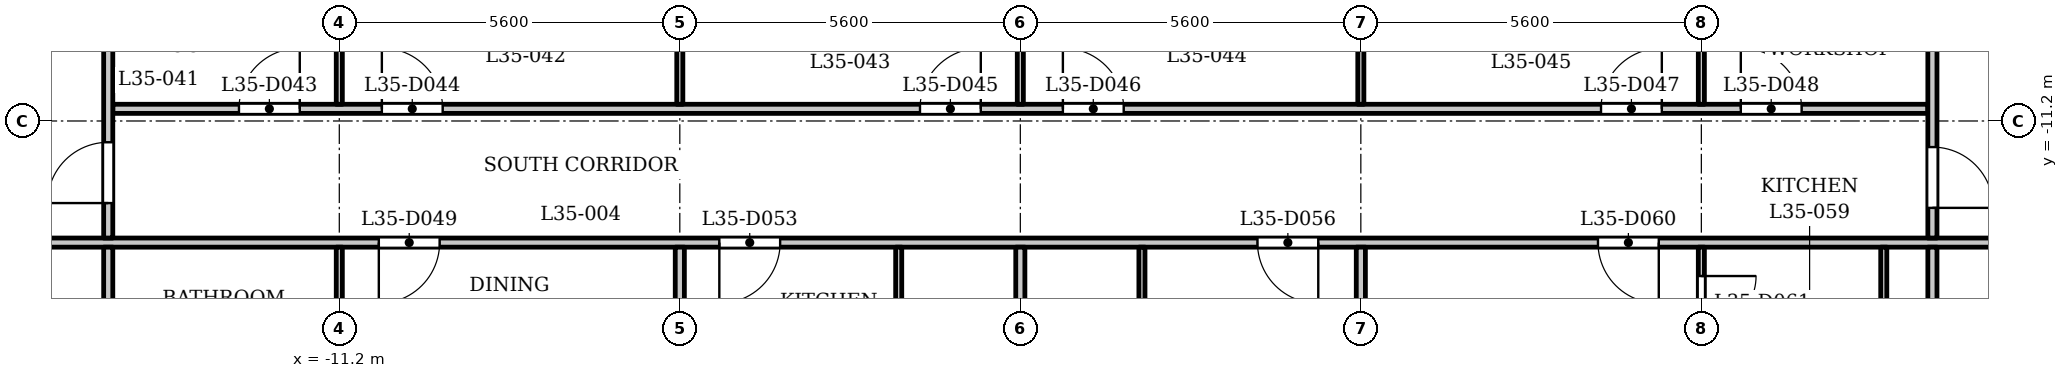
"""IFC4 building model, lengths in metres.
Left out: names, types, materials, properties, quantities, classifications, styles, units other than length and angle.
Written with IfcOpenShell. Run it as: python <this file> out.ifc"""

import sys

from ifc_helpers import new_model, si_unit, direction, frame, frame_2d, origin, place, context, subcontext, project, spatial, rectangle, extrude, element, fill, save


model = new_model("IFC4")
c1 = context("Model", 3, precision=1e-05, world=origin(), true_north=direction((0.0, 1.0)))
c2 = subcontext(c1, "Body", "Model", "MODEL_VIEW")
j1 = project(units=[si_unit("LENGTHUNIT", "METRE"), si_unit("PLANEANGLEUNIT", "RADIAN")], contexts=[c1])
p1 = place(None, origin())
s1 = spatial("IfcSite", under=j1, at=p1, CompositionType="ELEMENT")
p2 = place(p1, origin())
s2 = spatial("IfcBuilding", under=s1, at=p2, CompositionType="ELEMENT")
p3 = place(p2, frame((0.0, 0.0, 139.6)))
s3 = spatial("IfcBuildingStorey", under=s2, at=p3, CompositionType="ELEMENT", Elevation=139.6)
p4 = place(p3, frame((-17.4, -13.2, 0.0), z_axis=(0.0, 0.0, 1.0), x_axis=(1.0, 0.0, 0.0)))
e1 = element("IfcWall", 1, at=p4, inside=s3, PredefinedType="PARTITIONING", context=c2, shape_type="SweptSolid", body=[
    extrude(rectangle(XDim=34.8, YDim=0.15, at=frame_2d((17.4, 0.0))), origin(), (0.0, 0.0, 1.0), 3.2),
])
p5 = place(p4, frame((0.15, 0.0, 0.0)))
e2 = element("IfcOpeningElement", 2, at=p5, cuts=e1, PredefinedType="OPENING", context=c2, shape_type="SweptSolid", body=[
    extrude(rectangle(XDim=1.0, YDim=2.1, at=frame_2d((0.5, 1.05))), frame((0.0, 0.085, 0.0), z_axis=(0.0, -1.0, 0.0), x_axis=(1.0, 0.0, 0.0)), (0.0, 0.0, 1.0), 0.17),
])
p6 = place(p4, frame((33.55, 0.0, 0.0)))
e3 = element("IfcOpeningElement", 3, at=p6, cuts=e1, PredefinedType="OPENING", context=c2, shape_type="SweptSolid", body=[
    extrude(rectangle(XDim=1.0, YDim=2.1, at=frame_2d((0.5, 1.05))), frame((0.0, 0.085, 0.0), z_axis=(0.0, -1.0, 0.0), x_axis=(1.0, 0.0, 0.0)), (0.0, 0.0, 1.0), 0.17),
])
p7 = place(p4, frame((6.85, 0.0, 0.0)))
e4 = element("IfcOpeningElement", 4, at=p7, cuts=e1, PredefinedType="OPENING", context=c2, shape_type="SweptSolid", body=[
    extrude(rectangle(XDim=1.0, YDim=2.1, at=frame_2d((0.5, 1.05))), frame((0.0, 0.085, 0.0), z_axis=(0.0, -1.0, 0.0), x_axis=(1.0, 0.0, 0.0)), (0.0, 0.0, 1.0), 0.17),
])
p8 = place(p4, frame((12.45, 0.0, 0.0)))
e5 = element("IfcOpeningElement", 5, at=p8, cuts=e1, PredefinedType="OPENING", context=c2, shape_type="SweptSolid", body=[
    extrude(rectangle(XDim=1.0, YDim=2.1, at=frame_2d((0.5, 1.05))), frame((0.0, 0.085, 0.0), z_axis=(0.0, -1.0, 0.0), x_axis=(1.0, 0.0, 0.0)), (0.0, 0.0, 1.0), 0.17),
])
p9 = place(p4, frame((21.3, 0.0, 0.0)))
e6 = element("IfcOpeningElement", 6, at=p9, cuts=e1, PredefinedType="OPENING", context=c2, shape_type="SweptSolid", body=[
    extrude(rectangle(XDim=1.0, YDim=2.1, at=frame_2d((0.5, 1.05))), frame((0.0, 0.085, 0.0), z_axis=(0.0, -1.0, 0.0), x_axis=(1.0, 0.0, 0.0)), (0.0, 0.0, 1.0), 0.17),
])
p10 = place(p4, frame((26.9, 0.0, 0.0)))
e7 = element("IfcOpeningElement", 7, at=p10, cuts=e1, PredefinedType="OPENING", context=c2, shape_type="SweptSolid", body=[
    extrude(rectangle(XDim=1.0, YDim=2.1, at=frame_2d((0.5, 1.05))), frame((0.0, 0.085, 0.0), z_axis=(0.0, -1.0, 0.0), x_axis=(1.0, 0.0, 0.0)), (0.0, 0.0, 1.0), 0.17),
])
p11 = place(p3, frame((-14.925, -11.0, 0.0), z_axis=(0.0, 0.0, 1.0), x_axis=(1.0, 0.0, 0.0)))
e8 = element("IfcWall", 8, at=p11, inside=s3, PredefinedType="PARTITIONING", context=c2, shape_type="SweptSolid", body=[
    extrude(rectangle(XDim=29.85, YDim=0.15, at=frame_2d((14.925, 0.0))), origin(), (0.0, 0.0, 1.0), 3.2),
])
p12 = place(p11, frame((2.075, 0.0, 0.0)))
e9 = element("IfcOpeningElement", 9, at=p12, cuts=e8, PredefinedType="OPENING", context=c2, shape_type="SweptSolid", body=[
    extrude(rectangle(XDim=1.0, YDim=2.1, at=frame_2d((0.5, 1.05))), frame((0.0, 0.085, 0.0), z_axis=(0.0, -1.0, 0.0), x_axis=(1.0, 0.0, 0.0)), (0.0, 0.0, 1.0), 0.17),
])
p13 = place(p11, frame((4.425, 0.0, 0.0)))
e10 = element("IfcOpeningElement", 10, at=p13, cuts=e8, PredefinedType="OPENING", context=c2, shape_type="SweptSolid", body=[
    extrude(rectangle(XDim=1.0, YDim=2.1, at=frame_2d((0.5, 1.05))), frame((0.0, 0.085, 0.0), z_axis=(0.0, -1.0, 0.0), x_axis=(1.0, 0.0, 0.0)), (0.0, 0.0, 1.0), 0.17),
])
p14 = place(p11, frame((13.275, 0.0, 0.0)))
e11 = element("IfcOpeningElement", 11, at=p14, cuts=e8, PredefinedType="OPENING", context=c2, shape_type="SweptSolid", body=[
    extrude(rectangle(XDim=1.0, YDim=2.1, at=frame_2d((0.5, 1.05))), frame((0.0, 0.085, 0.0), z_axis=(0.0, -1.0, 0.0), x_axis=(1.0, 0.0, 0.0)), (0.0, 0.0, 1.0), 0.17),
])
p15 = place(p11, frame((15.625, 0.0, 0.0)))
e12 = element("IfcOpeningElement", 12, at=p15, cuts=e8, PredefinedType="OPENING", context=c2, shape_type="SweptSolid", body=[
    extrude(rectangle(XDim=1.0, YDim=2.1, at=frame_2d((0.5, 1.05))), frame((0.0, 0.085, 0.0), z_axis=(0.0, -1.0, 0.0), x_axis=(1.0, 0.0, 0.0)), (0.0, 0.0, 1.0), 0.17),
])
p16 = place(p11, frame((24.475, 0.0, 0.0)))
e13 = element("IfcOpeningElement", 13, at=p16, cuts=e8, PredefinedType="OPENING", context=c2, shape_type="SweptSolid", body=[
    extrude(rectangle(XDim=1.0, YDim=2.1, at=frame_2d((0.5, 1.05))), frame((0.0, 0.085, 0.0), z_axis=(0.0, -1.0, 0.0), x_axis=(1.0, 0.0, 0.0)), (0.0, 0.0, 1.0), 0.17),
])
p17 = place(p11, frame((26.774, 0.0, 0.0)))
e14 = element("IfcOpeningElement", 14, at=p17, cuts=e8, PredefinedType="OPENING", context=c2, shape_type="SweptSolid", body=[
    extrude(rectangle(XDim=1.0, YDim=2.1, at=frame_2d((0.5, 1.05))), frame((0.0, 0.085, 0.0), z_axis=(0.0, -1.0, 0.0), x_axis=(1.0, 0.0, 0.0)), (0.0, 0.0, 1.0), 0.17),
])
p18 = place(p3, frame((-15.0, -15.325, 0.0), z_axis=(0.0, 0.0, 1.0), x_axis=(0.0, 1.0, 0.0)))
e15 = element("IfcWall", 15, at=p18, inside=s3, PredefinedType="PARTITIONING", context=c2, shape_type="SweptSolid", body=[
    extrude(rectangle(XDim=2.05, YDim=0.15, at=frame_2d((1.025, 0.0))), origin(), (0.0, 0.0, 1.0), 3.2),
])
p19 = place(p3, frame((-15.0, -13.125, 0.0), z_axis=(0.0, 0.0, 1.0), x_axis=(0.0, 1.0, 0.0)))
e16 = element("IfcWall", 16, at=p19, inside=s3, PredefinedType="PARTITIONING", context=c2, shape_type="SweptSolid", body=[
    extrude(rectangle(XDim=6.356, YDim=0.15, at=frame_2d((3.178, 0.0))), origin(), (0.0, 0.0, 1.0), 3.2),
])
p20 = place(p19, frame((0.575, 0.0, 0.0)))
e17 = element("IfcOpeningElement", 17, at=p20, cuts=e16, PredefinedType="OPENING", context=c2, shape_type="SweptSolid", body=[
    extrude(rectangle(XDim=1.0, YDim=2.1, at=frame_2d((0.5, 1.05))), frame((0.0, 0.085, 0.0), z_axis=(0.0, -1.0, 0.0), x_axis=(1.0, 0.0, 0.0)), (0.0, 0.0, 1.0), 0.17),
])
p21 = place(p3, frame((-11.2, -16.75, 0.0), z_axis=(0.0, 0.0, 1.0), x_axis=(0.0, 1.0, 0.0)))
e18 = element("IfcWall", 18, at=p21, inside=s3, PredefinedType="PARTITIONING", context=c2, shape_type="SweptSolid", body=[
    extrude(rectangle(XDim=3.475, YDim=0.1, at=frame_2d((1.738, 0.0))), origin(), (0.0, 0.0, 1.0), 3.2),
])
for number, where, z_axis, x_axis in (
    (19, (-11.2, -10.925, 0.0), (0.0, 0.0, 1.0), (0.0, 1.0, 0.0)),
    (20, (-5.6, -10.925, 0.0), (0.0, 0.0, 1.0), (0.0, 1.0, 0.0)),
):
    element("IfcWall", number, at=place(p3, frame(where, z_axis=z_axis, x_axis=x_axis)), inside=s3, PredefinedType="PARTITIONING", context=c2, shape_type="SweptSolid", body=[
        extrude(rectangle(XDim=3.605, YDim=0.1, at=frame_2d((1.802, 0.0))), origin(), (0.0, 0.0, 1.0), 3.2),
    ])
p22 = place(p3, frame((-5.6, -16.75, 0.0), z_axis=(0.0, 0.0, 1.0), x_axis=(0.0, 1.0, 0.0)))
e21 = element("IfcWall", 21, at=p22, inside=s3, PredefinedType="PARTITIONING", context=c2, shape_type="SweptSolid", body=[
    extrude(rectangle(XDim=3.475, YDim=0.15, at=frame_2d((1.738, 0.0))), origin(), (0.0, 0.0, 1.0), 3.2),
])
p23 = place(p3, frame((-2.0, -16.75, 0.0), z_axis=(0.0, 0.0, 1.0), x_axis=(0.0, 1.0, 0.0)))
e22 = element("IfcWall", 22, at=p23, inside=s3, PredefinedType="PARTITIONING", context=c2, shape_type="SweptSolid", body=[
    extrude(rectangle(XDim=3.475, YDim=0.1, at=frame_2d((1.738, 0.0))), origin(), (0.0, 0.0, 1.0), 3.2),
])
p24 = place(p3, frame((0.0, -10.925, 0.0), z_axis=(0.0, 0.0, 1.0), x_axis=(0.0, 1.0, 0.0)))
e23 = element("IfcWall", 23, at=p24, inside=s3, PredefinedType="PARTITIONING", context=c2, shape_type="SweptSolid", body=[
    extrude(rectangle(XDim=3.605, YDim=0.1, at=frame_2d((1.802, 0.0))), origin(), (0.0, 0.0, 1.0), 3.2),
])
p25 = place(p3, frame((0.0, -16.75, 0.0), z_axis=(0.0, 0.0, 1.0), x_axis=(0.0, 1.0, 0.0)))
e24 = element("IfcWall", 24, at=p25, inside=s3, PredefinedType="PARTITIONING", context=c2, shape_type="SweptSolid", body=[
    extrude(rectangle(XDim=3.475, YDim=0.15, at=frame_2d((1.738, 0.0))), origin(), (0.0, 0.0, 1.0), 3.2),
])
p26 = place(p3, frame((2.0, -16.75, 0.0), z_axis=(0.0, 0.0, 1.0), x_axis=(0.0, 1.0, 0.0)))
e25 = element("IfcWall", 25, at=p26, inside=s3, PredefinedType="PARTITIONING", context=c2, shape_type="SweptSolid", body=[
    extrude(rectangle(XDim=3.475, YDim=0.1, at=frame_2d((1.738, 0.0))), origin(), (0.0, 0.0, 1.0), 3.2),
])
p27 = place(p3, frame((5.6, -10.925, 0.0), z_axis=(0.0, 0.0, 1.0), x_axis=(0.0, 1.0, 0.0)))
e26 = element("IfcWall", 26, at=p27, inside=s3, PredefinedType="PARTITIONING", context=c2, shape_type="SweptSolid", body=[
    extrude(rectangle(XDim=3.605, YDim=0.1, at=frame_2d((1.802, 0.0))), origin(), (0.0, 0.0, 1.0), 3.2),
])
p28 = place(p3, frame((5.6, -16.75, 0.0), z_axis=(0.0, 0.0, 1.0), x_axis=(0.0, 1.0, 0.0)))
e27 = element("IfcWall", 27, at=p28, inside=s3, PredefinedType="PARTITIONING", context=c2, shape_type="SweptSolid", body=[
    extrude(rectangle(XDim=3.475, YDim=0.15, at=frame_2d((1.738, 0.0))), origin(), (0.0, 0.0, 1.0), 3.2),
])
p29 = place(p3, frame((11.2, -16.75, 0.0), z_axis=(0.0, 0.0, 1.0), x_axis=(0.0, 1.0, 0.0)))
e28 = element("IfcWall", 28, at=p29, inside=s3, PredefinedType="PARTITIONING", context=c2, shape_type="SweptSolid", body=[
    extrude(rectangle(XDim=3.475, YDim=0.1, at=frame_2d((1.738, 0.0))), origin(), (0.0, 0.0, 1.0), 3.2),
])
p30 = place(p29, frame((2.1, 0.0, 0.0)))
e29 = element("IfcOpeningElement", 29, at=p30, cuts=e28, PredefinedType="OPENING", context=c2, shape_type="SweptSolid", body=[
    extrude(rectangle(XDim=0.9, YDim=2.1, at=frame_2d((0.45, 1.05))), frame((0.0, 0.06, 0.0), z_axis=(0.0, -1.0, 0.0), x_axis=(1.0, 0.0, 0.0)), (0.0, 0.0, 1.0), 0.12),
])
p31 = place(p3, frame((11.2, -10.925, 0.0), z_axis=(0.0, 0.0, 1.0), x_axis=(0.0, 1.0, 0.0)))
e30 = element("IfcWall", 30, at=p31, inside=s3, PredefinedType="PARTITIONING", context=c2, shape_type="SweptSolid", body=[
    extrude(rectangle(XDim=3.605, YDim=0.1, at=frame_2d((1.802, 0.0))), origin(), (0.0, 0.0, 1.0), 3.2),
])
p32 = place(p3, frame((14.2, -16.75, 0.0), z_axis=(0.0, 0.0, 1.0), x_axis=(0.0, 1.0, 0.0)))
e31 = element("IfcWall", 31, at=p32, inside=s3, PredefinedType="PARTITIONING", context=c2, shape_type="SweptSolid", body=[
    extrude(rectangle(XDim=3.475, YDim=0.1, at=frame_2d((1.738, 0.0))), origin(), (0.0, 0.0, 1.0), 3.2),
])
p33 = place(p3, frame((15.0, -15.325, 0.0), z_axis=(0.0, 0.0, 1.0), x_axis=(0.0, 1.0, 0.0)))
e32 = element("IfcWall", 32, at=p33, inside=s3, PredefinedType="PARTITIONING", context=c2, shape_type="SweptSolid", body=[
    extrude(rectangle(XDim=2.05, YDim=0.15, at=frame_2d((1.025, 0.0))), origin(), (0.0, 0.0, 1.0), 3.2),
])
p34 = place(p3, frame((15.0, -13.125, 0.0), z_axis=(0.0, 0.0, 1.0), x_axis=(0.0, 1.0, 0.0)))
e33 = element("IfcWall", 33, at=p34, inside=s3, PredefinedType="PARTITIONING", context=c2, shape_type="SweptSolid", body=[
    extrude(rectangle(XDim=6.356, YDim=0.15, at=frame_2d((3.178, 0.0))), origin(), (0.0, 0.0, 1.0), 3.2),
])
p35 = place(p34, frame((0.496, 0.0, 0.0)))
e34 = element("IfcOpeningElement", 34, at=p35, cuts=e33, PredefinedType="OPENING", context=c2, shape_type="SweptSolid", body=[
    extrude(rectangle(XDim=1.0, YDim=2.1, at=frame_2d((0.5, 1.05))), frame((0.0, 0.085, 0.0), z_axis=(0.0, -1.0, 0.0), x_axis=(1.0, 0.0, 0.0)), (0.0, 0.0, 1.0), 0.17),
])
p36 = place(p20, origin())
e35 = element("IfcDoor", 35, at=p36, inside=s3, OperationType="SINGLE_SWING_RIGHT", PredefinedType="DOOR", context=c2, shape_type="SweptSolid", body=[
    extrude(rectangle(XDim=1.0, YDim=2.1, at=frame_2d((0.5, 1.05))), frame((0.0, 0.025, 0.0), z_axis=(0.0, -1.0, 0.0), x_axis=(1.0, 0.0, 0.0)), (0.0, 0.0, 1.0), 0.05),
])
fill(e17, e35)
p37 = place(p35, origin())
e36 = element("IfcDoor", 36, at=p37, inside=s3, OperationType="SINGLE_SWING_LEFT", PredefinedType="DOOR", context=c2, shape_type="SweptSolid", body=[
    extrude(rectangle(XDim=1.0, YDim=2.1, at=frame_2d((0.5, 1.05))), frame((0.0, 0.025, 0.0), z_axis=(0.0, -1.0, 0.0), x_axis=(1.0, 0.0, 0.0)), (0.0, 0.0, 1.0), 0.05),
])
fill(e34, e36)
p38 = place(p12, origin())
e37 = element("IfcDoor", 37, at=p38, inside=s3, OperationType="SINGLE_SWING_LEFT", PredefinedType="DOOR", context=c2, shape_type="SweptSolid", body=[
    extrude(rectangle(XDim=1.0, YDim=2.1, at=frame_2d((0.5, 1.05))), frame((0.0, 0.025, 0.0), z_axis=(0.0, -1.0, 0.0), x_axis=(1.0, 0.0, 0.0)), (0.0, 0.0, 1.0), 0.05),
])
fill(e9, e37)
p39 = place(p13, origin())
e38 = element("IfcDoor", 38, at=p39, inside=s3, OperationType="SINGLE_SWING_RIGHT", PredefinedType="DOOR", context=c2, shape_type="SweptSolid", body=[
    extrude(rectangle(XDim=1.0, YDim=2.1, at=frame_2d((0.5, 1.05))), frame((0.0, 0.025, 0.0), z_axis=(0.0, -1.0, 0.0), x_axis=(1.0, 0.0, 0.0)), (0.0, 0.0, 1.0), 0.05),
])
fill(e10, e38)
p40 = place(p14, origin())
e39 = element("IfcDoor", 39, at=p40, inside=s3, OperationType="SINGLE_SWING_LEFT", PredefinedType="DOOR", context=c2, shape_type="SweptSolid", body=[
    extrude(rectangle(XDim=1.0, YDim=2.1, at=frame_2d((0.5, 1.05))), frame((0.0, 0.025, 0.0), z_axis=(0.0, -1.0, 0.0), x_axis=(1.0, 0.0, 0.0)), (0.0, 0.0, 1.0), 0.05),
])
fill(e11, e39)
p41 = place(p15, origin())
e40 = element("IfcDoor", 40, at=p41, inside=s3, OperationType="SINGLE_SWING_RIGHT", PredefinedType="DOOR", context=c2, shape_type="SweptSolid", body=[
    extrude(rectangle(XDim=1.0, YDim=2.1, at=frame_2d((0.5, 1.05))), frame((0.0, 0.025, 0.0), z_axis=(0.0, -1.0, 0.0), x_axis=(1.0, 0.0, 0.0)), (0.0, 0.0, 1.0), 0.05),
])
fill(e12, e40)
p42 = place(p16, origin())
e41 = element("IfcDoor", 41, at=p42, inside=s3, OperationType="SINGLE_SWING_LEFT", PredefinedType="DOOR", context=c2, shape_type="SweptSolid", body=[
    extrude(rectangle(XDim=1.0, YDim=2.1, at=frame_2d((0.5, 1.05))), frame((0.0, 0.025, 0.0), z_axis=(0.0, -1.0, 0.0), x_axis=(1.0, 0.0, 0.0)), (0.0, 0.0, 1.0), 0.05),
])
fill(e13, e41)
p43 = place(p17, origin())
e42 = element("IfcDoor", 42, at=p43, inside=s3, OperationType="SINGLE_SWING_RIGHT", PredefinedType="DOOR", context=c2, shape_type="SweptSolid", body=[
    extrude(rectangle(XDim=1.0, YDim=2.1, at=frame_2d((0.5, 1.05))), frame((0.0, 0.025, 0.0), z_axis=(0.0, -1.0, 0.0), x_axis=(1.0, 0.0, 0.0)), (0.0, 0.0, 1.0), 0.05),
])
fill(e14, e42)
p44 = place(p7, origin())
e43 = element("IfcDoor", 43, at=p44, inside=s3, OperationType="SINGLE_SWING_LEFT", PredefinedType="DOOR", context=c2, shape_type="SweptSolid", body=[
    extrude(rectangle(XDim=1.0, YDim=2.1, at=frame_2d((0.5, 1.05))), frame((0.0, 0.025, 0.0), z_axis=(0.0, -1.0, 0.0), x_axis=(1.0, 0.0, 0.0)), (0.0, 0.0, 1.0), 0.05),
])
fill(e4, e43)
p45 = place(p8, origin())
e44 = element("IfcDoor", 44, at=p45, inside=s3, OperationType="SINGLE_SWING_LEFT", PredefinedType="DOOR", context=c2, shape_type="SweptSolid", body=[
    extrude(rectangle(XDim=1.0, YDim=2.1, at=frame_2d((0.5, 1.05))), frame((0.0, 0.025, 0.0), z_axis=(0.0, -1.0, 0.0), x_axis=(1.0, 0.0, 0.0)), (0.0, 0.0, 1.0), 0.05),
])
fill(e5, e44)
p46 = place(p9, origin())
e45 = element("IfcDoor", 45, at=p46, inside=s3, OperationType="SINGLE_SWING_RIGHT", PredefinedType="DOOR", context=c2, shape_type="SweptSolid", body=[
    extrude(rectangle(XDim=1.0, YDim=2.1, at=frame_2d((0.5, 1.05))), frame((0.0, 0.025, 0.0), z_axis=(0.0, -1.0, 0.0), x_axis=(1.0, 0.0, 0.0)), (0.0, 0.0, 1.0), 0.05),
])
fill(e6, e45)
p47 = place(p10, origin())
e46 = element("IfcDoor", 46, at=p47, inside=s3, OperationType="SINGLE_SWING_RIGHT", PredefinedType="DOOR", context=c2, shape_type="SweptSolid", body=[
    extrude(rectangle(XDim=1.0, YDim=2.1, at=frame_2d((0.5, 1.05))), frame((0.0, 0.025, 0.0), z_axis=(0.0, -1.0, 0.0), x_axis=(1.0, 0.0, 0.0)), (0.0, 0.0, 1.0), 0.05),
])
fill(e7, e46)
p48 = place(p30, origin())
e47 = element("IfcDoor", 47, at=p48, inside=s3, OperationType="SINGLE_SWING_RIGHT", PredefinedType="DOOR", context=c2, shape_type="SweptSolid", body=[
    extrude(rectangle(XDim=0.9, YDim=2.1, at=frame_2d((0.45, 1.05))), frame((0.0, 0.025, 0.0), z_axis=(0.0, -1.0, 0.0), x_axis=(1.0, 0.0, 0.0)), (0.0, 0.0, 1.0), 0.05),
])
fill(e29, e47)
save(model, sys.argv[1])
